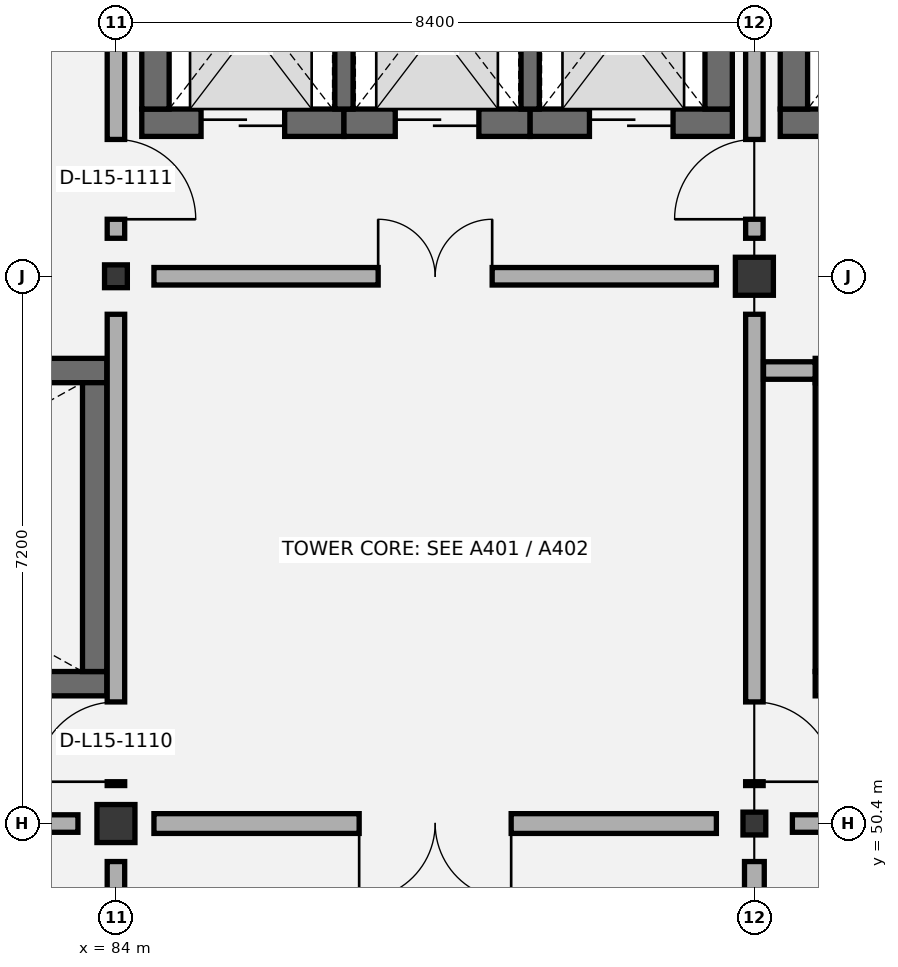
"""IFC4 building model, lengths in metres.
Left out: names, types, materials, properties, quantities, classifications, styles, units other than length and angle.
Written with IfcOpenShell. Run it as: python <this file> out.ifc"""

import sys

from ifc_helpers import new_model, si_unit, direction, frame, frame_2d, origin, origin_2d, place, context, subcontext, project, spatial, rectangle, i_section, extrude, element, fill, save


model = new_model("IFC4")
c1 = context("Model", 3, precision=1e-05, world=origin(), true_north=direction((0.0, 1.0)))
c2 = subcontext(c1, "Body", "Model", "MODEL_VIEW")
j1 = project(units=[si_unit("LENGTHUNIT", "METRE"), si_unit("PLANEANGLEUNIT", "RADIAN")], contexts=[c1])
p1 = place(None, origin())
s1 = spatial("IfcSite", under=j1, at=p1, CompositionType="ELEMENT")
p2 = place(p1, origin())
s2 = spatial("IfcBuilding", under=s1, at=p2, CompositionType="ELEMENT")
p3 = place(p2, frame((0.0, 0.0, 69.0)))
s3 = spatial("IfcBuildingStorey", under=s2, at=p3, CompositionType="ELEMENT", Elevation=69.0)
p4 = place(p3, frame((84.0, 50.4, 0.0), z_axis=(0.0, 0.0, 1.0), x_axis=(1.0, 0.0, 0.0)))
e1 = element("IfcColumn", 1, at=p4, inside=s3, PredefinedType="COLUMN", context=c2, shape_type="SweptSolid", body=[
    extrude(rectangle(XDim=0.5, YDim=0.5, at=origin_2d()), origin(), (0.0, 0.0, 1.0), 4.8),
])
for number, where, z_axis, x_axis in (
    (2, (84.0, 57.6, 0.0), (0.0, 0.0, 1.0), (1.0, 0.0, 0.0)),
    (3, (92.4, 50.4, 0.0), (0.0, 0.0, 1.0), (1.0, 0.0, 0.0)),
):
    element("IfcColumn", number, at=place(p3, frame(where, z_axis=z_axis, x_axis=x_axis)), inside=s3, PredefinedType="COLUMN", context=c2, shape_type="SweptSolid", body=[
        extrude(i_section(OverallWidth=0.3, OverallDepth=0.3, WebThickness=0.011, FlangeThickness=0.019, FilletRadius=0.027, at=origin_2d()), origin(), (0.0, 0.0, 1.0), 4.8),
    ])
p5 = place(p3, frame((92.4, 57.6, 0.0), z_axis=(0.0, 0.0, 1.0), x_axis=(1.0, 0.0, 0.0)))
e4 = element("IfcColumn", 4, at=p5, inside=s3, PredefinedType="COLUMN", context=c2, shape_type="SweptSolid", body=[
    extrude(rectangle(XDim=0.5, YDim=0.5, at=origin_2d()), origin(), (0.0, 0.0, 1.0), 4.8),
])
p6 = place(p3, frame((76.4, 52.24, 0.0), z_axis=(0.0, 0.0, 1.0), x_axis=(1.0, 0.0, 0.0)))
e5 = element("IfcWall", 5, at=p6, inside=s3, PredefinedType="SHEAR", context=c2, shape_type="SweptSolid", body=[
    extrude(rectangle(XDim=7.48, YDim=0.32, at=frame_2d((3.74, 0.0))), origin(), (0.0, 0.0, 1.0), 4.6),
])
p7 = place(p6, frame((0.45, 0.0, 0.0)))
e6 = element("IfcOpeningElement", 6, at=p7, cuts=e5, PredefinedType="OPENING", context=c2, shape_type="SweptSolid", body=[
    extrude(rectangle(XDim=1.05, YDim=2.15, at=frame_2d((0.525, 1.075))), frame((0.0, 0.17, 0.0), z_axis=(0.0, -1.0, 0.0), x_axis=(1.0, 0.0, 0.0)), (0.0, 0.0, 1.0), 0.34),
])
p8 = place(p3, frame((76.4, 56.36, 0.0), z_axis=(0.0, 0.0, 1.0), x_axis=(1.0, 0.0, 0.0)))
e7 = element("IfcWall", 7, at=p8, inside=s3, PredefinedType="SHEAR", context=c2, shape_type="SweptSolid", body=[
    extrude(rectangle(XDim=7.48, YDim=0.32, at=frame_2d((3.74, 0.0))), origin(), (0.0, 0.0, 1.0), 4.6),
])
p9 = place(p3, frame((83.72, 52.4, 0.0), z_axis=(0.0, 0.0, 1.0), x_axis=(0.0, 1.0, 0.0)))
e8 = element("IfcWall", 8, at=p9, inside=s3, PredefinedType="SHEAR", context=c2, shape_type="SweptSolid", body=[
    extrude(rectangle(XDim=3.8, YDim=0.32, at=frame_2d((1.9, 0.0))), origin(), (0.0, 0.0, 1.0), 4.6),
])
p10 = place(p3, frame((93.2, 52.24, 0.0), z_axis=(0.0, 0.0, 1.0), x_axis=(1.0, 0.0, 0.0)))
e9 = element("IfcWall", 9, at=p10, inside=s3, PredefinedType="SHEAR", context=c2, shape_type="SweptSolid", body=[
    extrude(rectangle(XDim=7.48, YDim=0.32, at=frame_2d((3.74, 0.0))), origin(), (0.0, 0.0, 1.0), 4.6),
])
p11 = place(p10, frame((0.45, 0.0, 0.0)))
e10 = element("IfcOpeningElement", 10, at=p11, cuts=e9, PredefinedType="OPENING", context=c2, shape_type="SweptSolid", body=[
    extrude(rectangle(XDim=1.05, YDim=2.15, at=frame_2d((0.525, 1.075))), frame((0.0, 0.17, 0.0), z_axis=(0.0, -1.0, 0.0), x_axis=(1.0, 0.0, 0.0)), (0.0, 0.0, 1.0), 0.34),
])
p12 = place(p3, frame((93.2, 56.36, 0.0), z_axis=(0.0, 0.0, 1.0), x_axis=(1.0, 0.0, 0.0)))
e11 = element("IfcWall", 11, at=p12, inside=s3, PredefinedType="SHEAR", context=c2, shape_type="SweptSolid", body=[
    extrude(rectangle(XDim=7.48, YDim=0.32, at=frame_2d((3.74, 0.0))), origin(), (0.0, 0.0, 1.0), 4.6),
])
p13 = place(p3, frame((93.36, 52.4, 0.0), z_axis=(0.0, 0.0, 1.0), x_axis=(0.0, 1.0, 0.0)))
e12 = element("IfcWall", 12, at=p13, inside=s3, PredefinedType="SHEAR", context=c2, shape_type="SweptSolid", body=[
    extrude(rectangle(XDim=3.8, YDim=0.32, at=frame_2d((1.9, 0.0))), origin(), (0.0, 0.0, 1.0), 4.6),
])
p14 = place(p3, frame((84.34, 59.62, 0.0), z_axis=(0.0, 0.0, 1.0), x_axis=(1.0, 0.0, 0.0)))
e13 = element("IfcWall", 13, at=p14, inside=s3, PredefinedType="SHEAR", context=c2, shape_type="SweptSolid", body=[
    extrude(rectangle(XDim=2.66, YDim=0.36, at=frame_2d((1.33, 0.0))), origin(), (0.0, 0.0, 1.0), 5.9),
])
p15 = place(p14, frame((0.78, 0.0, 0.0)))
e14 = element("IfcOpeningElement", 14, at=p15, cuts=e13, PredefinedType="OPENING", context=c2, shape_type="SweptSolid", body=[
    extrude(rectangle(XDim=1.1, YDim=2.15, at=frame_2d((0.55, 1.075))), frame((0.0, 0.19, 0.0), z_axis=(0.0, -1.0, 0.0), x_axis=(1.0, 0.0, 0.0)), (0.0, 0.0, 1.0), 0.38),
])
p16 = place(p3, frame((87.0, 59.62, 0.0), z_axis=(0.0, 0.0, 1.0), x_axis=(1.0, 0.0, 0.0)))
e15 = element("IfcWall", 15, at=p16, inside=s3, PredefinedType="SHEAR", context=c2, shape_type="SweptSolid", body=[
    extrude(rectangle(XDim=2.45, YDim=0.36, at=frame_2d((1.225, 0.0))), origin(), (0.0, 0.0, 1.0), 5.9),
])
p17 = place(p16, frame((0.675, 0.0, 0.0)))
e16 = element("IfcOpeningElement", 16, at=p17, cuts=e15, PredefinedType="OPENING", context=c2, shape_type="SweptSolid", body=[
    extrude(rectangle(XDim=1.1, YDim=2.15, at=frame_2d((0.55, 1.075))), frame((0.0, 0.19, 0.0), z_axis=(0.0, -1.0, 0.0), x_axis=(1.0, 0.0, 0.0)), (0.0, 0.0, 1.0), 0.38),
])
p18 = place(p3, frame((89.45, 59.62, 0.0), z_axis=(0.0, 0.0, 1.0), x_axis=(1.0, 0.0, 0.0)))
e17 = element("IfcWall", 17, at=p18, inside=s3, PredefinedType="SHEAR", context=c2, shape_type="SweptSolid", body=[
    extrude(rectangle(XDim=2.66, YDim=0.36, at=frame_2d((1.33, 0.0))), origin(), (0.0, 0.0, 1.0), 5.9),
])
p19 = place(p18, frame((0.78, 0.0, 0.0)))
e18 = element("IfcOpeningElement", 18, at=p19, cuts=e17, PredefinedType="OPENING", context=c2, shape_type="SweptSolid", body=[
    extrude(rectangle(XDim=1.1, YDim=2.15, at=frame_2d((0.55, 1.075))), frame((0.0, 0.19, 0.0), z_axis=(0.0, -1.0, 0.0), x_axis=(1.0, 0.0, 0.0)), (0.0, 0.0, 1.0), 0.38),
])
for number, where, z_axis, x_axis in (
    (19, (84.52, 59.8, 0.0), (0.0, 0.0, 1.0), (0.0, 1.0, 0.0)),
    (20, (91.93, 59.8, 0.0), (0.0, 0.0, 1.0), (0.0, 1.0, 0.0)),
):
    element("IfcWall", number, at=place(p3, frame(where, z_axis=z_axis, x_axis=x_axis)), inside=s3, PredefinedType="SHEAR", context=c2, shape_type="SweptSolid", body=[
        extrude(rectangle(XDim=2.8, YDim=0.36, at=frame_2d((1.4, 0.0))), origin(), (0.0, 0.0, 1.0), 5.9),
    ])
for number, where, z_axis, x_axis in (
    (21, (87.0, 59.8, 0.0), (0.0, 0.0, 1.0), (0.0, 1.0, 0.0)),
    (22, (89.45, 59.8, 0.0), (0.0, 0.0, 1.0), (0.0, 1.0, 0.0)),
):
    element("IfcWall", number, at=place(p3, frame(where, z_axis=z_axis, x_axis=x_axis)), inside=s3, PredefinedType="SHEAR", context=c2, shape_type="SweptSolid", body=[
        extrude(rectangle(XDim=2.8, YDim=0.24, at=frame_2d((1.4, 0.0))), origin(), (0.0, 0.0, 1.0), 5.9),
    ])
p20 = place(p3, frame((92.74, 59.62, 0.0), z_axis=(0.0, 0.0, 1.0), x_axis=(1.0, 0.0, 0.0)))
e23 = element("IfcWall", 23, at=p20, inside=s3, PredefinedType="SHEAR", context=c2, shape_type="SweptSolid", body=[
    extrude(rectangle(XDim=2.87, YDim=0.36, at=frame_2d((1.435, 0.0))), origin(), (0.0, 0.0, 1.0), 5.9),
])
p21 = place(p20, frame((0.76, 0.0, 0.0)))
e24 = element("IfcOpeningElement", 24, at=p21, cuts=e23, PredefinedType="OPENING", context=c2, shape_type="SweptSolid", body=[
    extrude(rectangle(XDim=1.35, YDim=2.2, at=frame_2d((0.675, 1.1))), frame((0.0, 0.19, 0.0), z_axis=(0.0, -1.0, 0.0), x_axis=(1.0, 0.0, 0.0)), (0.0, 0.0, 1.0), 0.38),
])
p22 = place(p3, frame((92.92, 59.8, 0.0), z_axis=(0.0, 0.0, 1.0), x_axis=(0.0, 1.0, 0.0)))
e25 = element("IfcWall", 25, at=p22, inside=s3, PredefinedType="SHEAR", context=c2, shape_type="SweptSolid", body=[
    extrude(rectangle(XDim=2.8, YDim=0.36, at=frame_2d((1.4, 0.0))), origin(), (0.0, 0.0, 1.0), 5.9),
])
p23 = place(p3, frame((84.0, 43.7, 0.0), z_axis=(0.0, 0.0, 1.0), x_axis=(0.0, 1.0, 0.0)))
e26 = element("IfcWall", 26, at=p23, inside=s3, PredefinedType="PARTITIONING", context=c2, shape_type="SweptSolid", body=[
    extrude(rectangle(XDim=6.2, YDim=0.23, at=frame_2d((3.1, 0.0))), origin(), (0.0, 0.0, 1.0), 4.095),
])
p24 = place(p3, frame((76.1, 50.4, 0.0), z_axis=(0.0, 0.0, 1.0), x_axis=(1.0, 0.0, 0.0)))
e27 = element("IfcWall", 27, at=p24, inside=s3, PredefinedType="PARTITIONING", context=c2, shape_type="SweptSolid", body=[
    extrude(rectangle(XDim=7.4, YDim=0.23, at=frame_2d((3.7, 0.0))), origin(), (0.0, 0.0, 1.0), 4.305),
])
p25 = place(p24, frame((2.95, 0.0, 0.0)))
e28 = element("IfcOpeningElement", 28, at=p25, cuts=e27, PredefinedType="OPENING", context=c2, shape_type="SweptSolid", body=[
    extrude(rectangle(XDim=1.5, YDim=2.15, at=frame_2d((0.75, 1.075))), frame((0.0, 0.125, 0.0), z_axis=(0.0, -1.0, 0.0), x_axis=(1.0, 0.0, 0.0)), (0.0, 0.0, 1.0), 0.25),
])
p26 = place(p3, frame((84.0, 50.9, 0.0), z_axis=(0.0, 0.0, 1.0), x_axis=(0.0, 1.0, 0.0)))
e29 = element("IfcWall", 29, at=p26, inside=s3, PredefinedType="PARTITIONING", context=c2, shape_type="SweptSolid", body=[
    extrude(rectangle(XDim=6.2, YDim=0.23, at=frame_2d((3.1, 0.0))), origin(), (0.0, 0.0, 1.0), 4.305),
])
p27 = place(p26, frame((0.05, 0.0, 0.0)))
e30 = element("IfcOpeningElement", 30, at=p27, cuts=e29, PredefinedType="OPENING", context=c2, shape_type="SweptSolid", body=[
    extrude(rectangle(XDim=1.05, YDim=2.15, at=frame_2d((0.525, 1.075))), frame((0.0, 0.125, 0.0), z_axis=(0.0, -1.0, 0.0), x_axis=(1.0, 0.0, 0.0)), (0.0, 0.0, 1.0), 0.25),
])
p28 = place(p3, frame((84.0, 58.1, 0.0), z_axis=(0.0, 0.0, 1.0), x_axis=(0.0, 1.0, 0.0)))
e31 = element("IfcWall", 31, at=p28, inside=s3, PredefinedType="PARTITIONING", context=c2, shape_type="SweptSolid", body=[
    extrude(rectangle(XDim=6.2, YDim=0.23, at=frame_2d((3.1, 0.0))), origin(), (0.0, 0.0, 1.0), 4.095),
])
p29 = place(p28, frame((0.25, 0.0, 0.0)))
e32 = element("IfcOpeningElement", 32, at=p29, cuts=e31, PredefinedType="OPENING", context=c2, shape_type="SweptSolid", body=[
    extrude(rectangle(XDim=1.05, YDim=2.15, at=frame_2d((0.525, 1.075))), frame((0.0, 0.125, 0.0), z_axis=(0.0, -1.0, 0.0), x_axis=(1.0, 0.0, 0.0)), (0.0, 0.0, 1.0), 0.25),
])
p30 = place(p3, frame((92.4, 43.7, 0.0), z_axis=(0.0, 0.0, 1.0), x_axis=(0.0, 1.0, 0.0)))
e33 = element("IfcWall", 33, at=p30, inside=s3, PredefinedType="PARTITIONING", context=c2, shape_type="SweptSolid", body=[
    extrude(rectangle(XDim=6.2, YDim=0.26, at=frame_2d((3.1, 0.0))), origin(), (0.0, 0.0, 1.0), 4.305),
])
p31 = place(p30, frame((2.15, 0.0, 0.0)))
e34 = element("IfcOpeningElement", 34, at=p31, cuts=e33, PredefinedType="OPENING", context=c2, shape_type="SweptSolid", body=[
    extrude(rectangle(XDim=1.9, YDim=2.3, at=frame_2d((0.95, 1.15))), frame((0.0, 0.14, 0.0), z_axis=(0.0, -1.0, 0.0), x_axis=(1.0, 0.0, 0.0)), (0.0, 0.0, 1.0), 0.28),
])
p32 = place(p3, frame((84.5, 50.4, 0.0), z_axis=(0.0, 0.0, 1.0), x_axis=(1.0, 0.0, 0.0)))
e35 = element("IfcWall", 35, at=p32, inside=s3, PredefinedType="PARTITIONING", context=c2, shape_type="SweptSolid", body=[
    extrude(rectangle(XDim=7.4, YDim=0.26, at=frame_2d((3.7, 0.0))), origin(), (0.0, 0.0, 1.0), 4.325),
])
p33 = place(p32, frame((2.7, 0.0, 0.0)))
e36 = element("IfcOpeningElement", 36, at=p33, cuts=e35, PredefinedType="OPENING", context=c2, shape_type="SweptSolid", body=[
    extrude(rectangle(XDim=2.0, YDim=2.35, at=frame_2d((1.0, 1.175))), frame((0.0, 0.14, 0.0), z_axis=(0.0, -1.0, 0.0), x_axis=(1.0, 0.0, 0.0)), (0.0, 0.0, 1.0), 0.28),
])
p34 = place(p3, frame((92.4, 50.9, 0.0), z_axis=(0.0, 0.0, 1.0), x_axis=(0.0, 1.0, 0.0)))
e37 = element("IfcWall", 37, at=p34, inside=s3, PredefinedType="PARTITIONING", context=c2, shape_type="SweptSolid", body=[
    extrude(rectangle(XDim=6.2, YDim=0.23, at=frame_2d((3.1, 0.0))), origin(), (0.0, 0.0, 1.0), 4.095),
])
p35 = place(p34, frame((0.05, 0.0, 0.0)))
e38 = element("IfcOpeningElement", 38, at=p35, cuts=e37, PredefinedType="OPENING", context=c2, shape_type="SweptSolid", body=[
    extrude(rectangle(XDim=1.05, YDim=2.15, at=frame_2d((0.525, 1.075))), frame((0.0, 0.125, 0.0), z_axis=(0.0, -1.0, 0.0), x_axis=(1.0, 0.0, 0.0)), (0.0, 0.0, 1.0), 0.25),
])
p36 = place(p3, frame((84.5, 57.6, 0.0), z_axis=(0.0, 0.0, 1.0), x_axis=(1.0, 0.0, 0.0)))
e39 = element("IfcWall", 39, at=p36, inside=s3, PredefinedType="PARTITIONING", context=c2, shape_type="SweptSolid", body=[
    extrude(rectangle(XDim=7.4, YDim=0.23, at=frame_2d((3.7, 0.0))), origin(), (0.0, 0.0, 1.0), 4.325),
])
p37 = place(p36, frame((2.95, 0.0, 0.0)))
e40 = element("IfcOpeningElement", 40, at=p37, cuts=e39, PredefinedType="OPENING", context=c2, shape_type="SweptSolid", body=[
    extrude(rectangle(XDim=1.5, YDim=2.15, at=frame_2d((0.75, 1.075))), frame((0.0, 0.125, 0.0), z_axis=(0.0, -1.0, 0.0), x_axis=(1.0, 0.0, 0.0)), (0.0, 0.0, 1.0), 0.25),
])
p38 = place(p3, frame((92.4, 58.1, 0.0), z_axis=(0.0, 0.0, 1.0), x_axis=(0.0, 1.0, 0.0)))
e41 = element("IfcWall", 41, at=p38, inside=s3, PredefinedType="PARTITIONING", context=c2, shape_type="SweptSolid", body=[
    extrude(rectangle(XDim=6.2, YDim=0.23, at=frame_2d((3.1, 0.0))), origin(), (0.0, 0.0, 1.0), 4.095),
])
p39 = place(p38, frame((0.25, 0.0, 0.0)))
e42 = element("IfcOpeningElement", 42, at=p39, cuts=e41, PredefinedType="OPENING", context=c2, shape_type="SweptSolid", body=[
    extrude(rectangle(XDim=1.05, YDim=2.15, at=frame_2d((0.525, 1.075))), frame((0.0, 0.125, 0.0), z_axis=(0.0, -1.0, 0.0), x_axis=(1.0, 0.0, 0.0)), (0.0, 0.0, 1.0), 0.25),
])
p40 = place(p3, frame((92.9, 50.4, 0.0), z_axis=(0.0, 0.0, 1.0), x_axis=(1.0, 0.0, 0.0)))
e43 = element("IfcWall", 43, at=p40, inside=s3, PredefinedType="PARTITIONING", context=c2, shape_type="SweptSolid", body=[
    extrude(rectangle(XDim=7.4, YDim=0.23, at=frame_2d((3.7, 0.0))), origin(), (0.0, 0.0, 1.0), 3.995),
])
p41 = place(p40, frame((2.95, 0.0, 0.0)))
e44 = element("IfcOpeningElement", 44, at=p41, cuts=e43, PredefinedType="OPENING", context=c2, shape_type="SweptSolid", body=[
    extrude(rectangle(XDim=1.5, YDim=2.15, at=frame_2d((0.75, 1.075))), frame((0.0, 0.125, 0.0), z_axis=(0.0, -1.0, 0.0), x_axis=(1.0, 0.0, 0.0)), (0.0, 0.0, 1.0), 0.25),
])
p42 = place(p3, frame((92.52, 56.36, 0.0), z_axis=(0.0, 0.0, 1.0), x_axis=(1.0, 0.0, 0.0)))
e45 = element("IfcWall", 45, at=p42, inside=s3, PredefinedType="PARTITIONING", context=c2, shape_type="SweptSolid", body=[
    extrude(rectangle(XDim=0.68, YDim=0.23, at=frame_2d((0.34, 0.0))), origin(), (0.0, 0.0, 1.0), 4.6),
])
p43 = place(p15, origin())
e46 = element("IfcDoor", 46, at=p43, inside=s3, OperationType="DOUBLE_DOOR_SLIDING", PredefinedType="DOOR", context=c2, shape_type="SweptSolid", body=[
    extrude(rectangle(XDim=1.1, YDim=2.15, at=frame_2d((0.55, 1.075))), frame((0.0, 0.025, 0.0), z_axis=(0.0, -1.0, 0.0), x_axis=(1.0, 0.0, 0.0)), (0.0, 0.0, 1.0), 0.05),
])
fill(e14, e46)
p44 = place(p17, origin())
e47 = element("IfcDoor", 47, at=p44, inside=s3, OperationType="DOUBLE_DOOR_SLIDING", PredefinedType="DOOR", context=c2, shape_type="SweptSolid", body=[
    extrude(rectangle(XDim=1.1, YDim=2.15, at=frame_2d((0.55, 1.075))), frame((0.0, 0.025, 0.0), z_axis=(0.0, -1.0, 0.0), x_axis=(1.0, 0.0, 0.0)), (0.0, 0.0, 1.0), 0.05),
])
fill(e16, e47)
p45 = place(p19, origin())
e48 = element("IfcDoor", 48, at=p45, inside=s3, OperationType="DOUBLE_DOOR_SLIDING", PredefinedType="DOOR", context=c2, shape_type="SweptSolid", body=[
    extrude(rectangle(XDim=1.1, YDim=2.15, at=frame_2d((0.55, 1.075))), frame((0.0, 0.025, 0.0), z_axis=(0.0, -1.0, 0.0), x_axis=(1.0, 0.0, 0.0)), (0.0, 0.0, 1.0), 0.05),
])
fill(e18, e48)
p46 = place(p27, origin())
e49 = element("IfcDoor", 49, at=p46, inside=s3, OperationType="SINGLE_SWING_LEFT", PredefinedType="DOOR", context=c2, shape_type="SweptSolid", body=[
    extrude(rectangle(XDim=1.05, YDim=2.15, at=frame_2d((0.525, 1.075))), frame((0.0, 0.025, 0.0), z_axis=(0.0, -1.0, 0.0), x_axis=(1.0, 0.0, 0.0)), (0.0, 0.0, 1.0), 0.05),
])
fill(e30, e49)
p47 = place(p29, frame((1.05, 0.0, 0.0), z_axis=(0.0, 0.0, 1.0), x_axis=(-1.0, 0.0, 0.0)))
e50 = element("IfcDoor", 50, at=p47, inside=s3, OperationType="SINGLE_SWING_RIGHT", PredefinedType="DOOR", context=c2, shape_type="SweptSolid", body=[
    extrude(rectangle(XDim=1.05, YDim=2.15, at=frame_2d((0.525, 1.075))), frame((0.0, 0.025, 0.0), z_axis=(0.0, -1.0, 0.0), x_axis=(1.0, 0.0, 0.0)), (0.0, 0.0, 1.0), 0.05),
])
fill(e32, e50)
p48 = place(p33, frame((2.0, 0.0, 0.0), z_axis=(0.0, 0.0, 1.0), x_axis=(-1.0, 0.0, 0.0)))
e51 = element("IfcDoor", 51, at=p48, inside=s3, OperationType="DOUBLE_DOOR_SINGLE_SWING", PredefinedType="DOOR", context=c2, shape_type="SweptSolid", body=[
    extrude(rectangle(XDim=2.0, YDim=2.35, at=frame_2d((1.0, 1.175))), frame((0.0, 0.025, 0.0), z_axis=(0.0, -1.0, 0.0), x_axis=(1.0, 0.0, 0.0)), (0.0, 0.0, 1.0), 0.05),
])
fill(e36, e51)
p49 = place(p35, frame((1.05, 0.0, 0.0), z_axis=(0.0, 0.0, 1.0), x_axis=(-1.0, 0.0, 0.0)))
e52 = element("IfcDoor", 52, at=p49, inside=s3, OperationType="SINGLE_SWING_RIGHT", PredefinedType="DOOR", context=c2, shape_type="SweptSolid", body=[
    extrude(rectangle(XDim=1.05, YDim=2.15, at=frame_2d((0.525, 1.075))), frame((0.0, 0.025, 0.0), z_axis=(0.0, -1.0, 0.0), x_axis=(1.0, 0.0, 0.0)), (0.0, 0.0, 1.0), 0.05),
])
fill(e38, e52)
p50 = place(p37, origin())
e53 = element("IfcDoor", 53, at=p50, inside=s3, OperationType="DOUBLE_DOOR_SINGLE_SWING", PredefinedType="DOOR", context=c2, shape_type="SweptSolid", body=[
    extrude(rectangle(XDim=1.5, YDim=2.15, at=frame_2d((0.75, 1.075))), frame((0.0, 0.025, 0.0), z_axis=(0.0, -1.0, 0.0), x_axis=(1.0, 0.0, 0.0)), (0.0, 0.0, 1.0), 0.05),
])
fill(e40, e53)
p51 = place(p39, origin())
e54 = element("IfcDoor", 54, at=p51, inside=s3, OperationType="SINGLE_SWING_LEFT", PredefinedType="DOOR", context=c2, shape_type="SweptSolid", body=[
    extrude(rectangle(XDim=1.05, YDim=2.15, at=frame_2d((0.525, 1.075))), frame((0.0, 0.025, 0.0), z_axis=(0.0, -1.0, 0.0), x_axis=(1.0, 0.0, 0.0)), (0.0, 0.0, 1.0), 0.05),
])
fill(e42, e54)
save(model, sys.argv[1])
